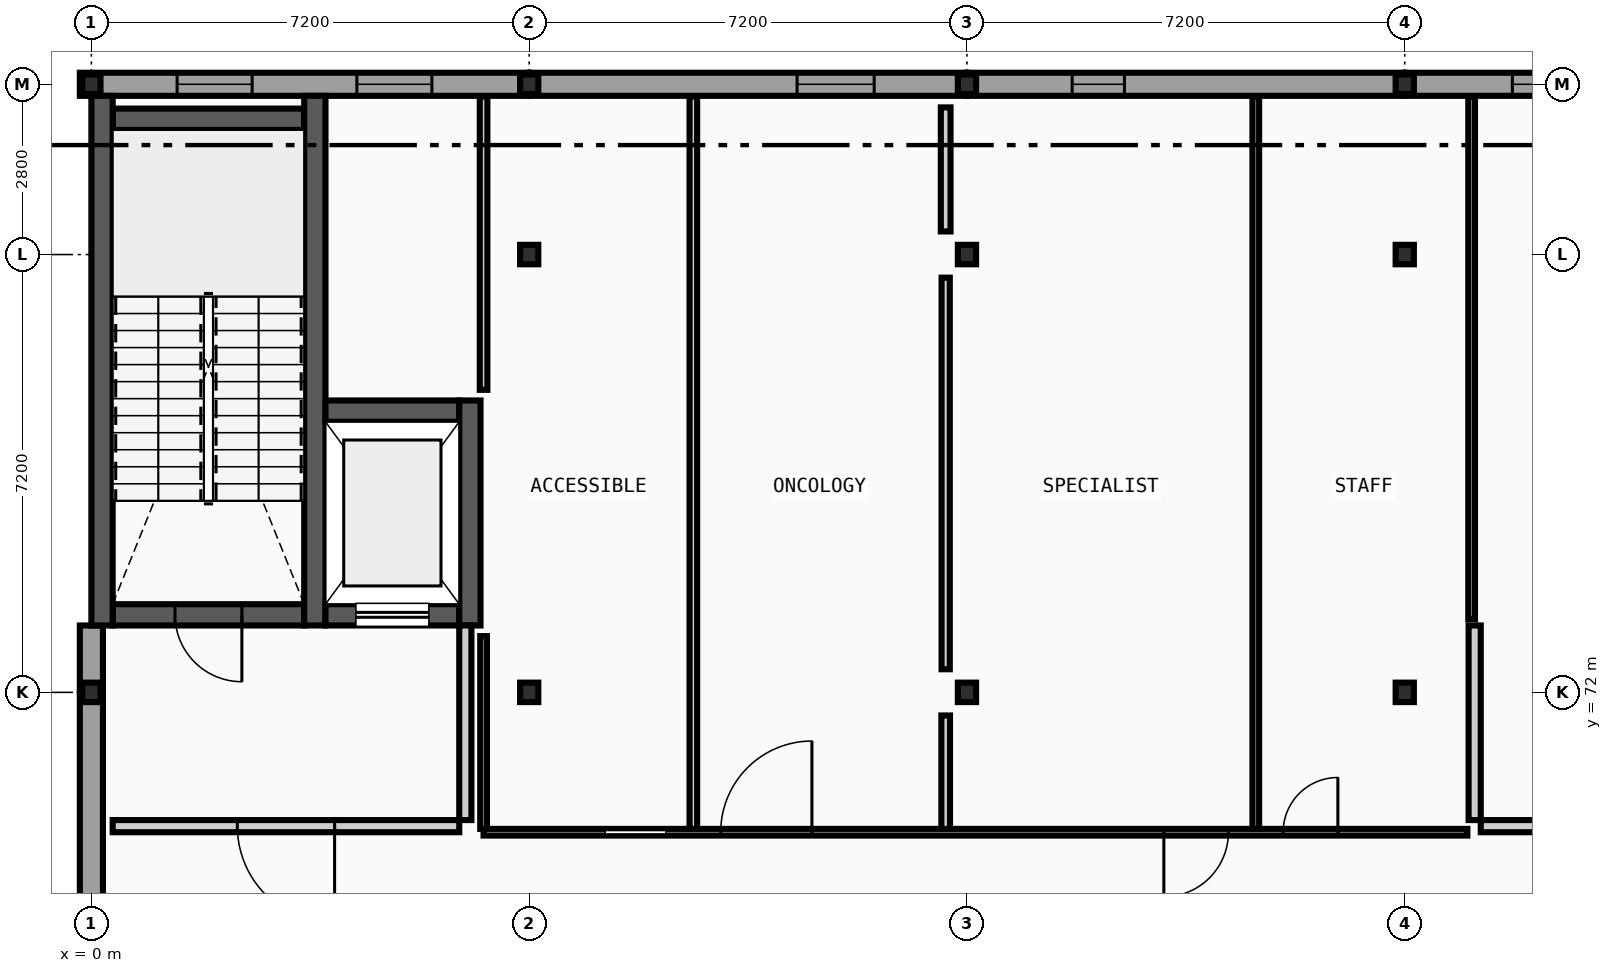
"""IFC4 building model, lengths in metres.
Left out: names, types, materials, properties, quantities, classifications, styles, units other than length and angle.
Written with IfcOpenShell. Run it as: python <this file> out.ifc"""

import sys

from ifc_helpers import new_model, si_unit, direction, frame, frame_2d, origin, origin_2d, place, context, subcontext, project, spatial, rectangle, i_section, extrude, element, fill, save


model = new_model("IFC4")
c1 = context("Model", 3, precision=1e-05, world=origin(), true_north=direction((0.0, 1.0)))
c2 = subcontext(c1, "Body", "Model", "MODEL_VIEW")
j1 = project(units=[si_unit("LENGTHUNIT", "METRE"), si_unit("PLANEANGLEUNIT", "RADIAN")], contexts=[c1])
p1 = place(None, origin())
s1 = spatial("IfcSite", under=j1, at=p1, CompositionType="ELEMENT")
p2 = place(p1, origin())
s2 = spatial("IfcBuilding", under=s1, at=p2, CompositionType="ELEMENT")
p3 = place(p2, frame((0.0, 0.0, 9.6)))
s3 = spatial("IfcBuildingStorey", under=s2, at=p3, CompositionType="ELEMENT", Elevation=9.6)
for number, where, z_axis, x_axis in (
    (1, (0.0, 72.0, 0.0), (0.0, 0.0, 1.0), (1.0, 0.0, 0.0)),
    (2, (0.0, 82.0, 0.0), (0.0, 0.0, 1.0), (1.0, 0.0, 0.0)),
    (3, (7.2, 72.0, 0.0), (0.0, 0.0, 1.0), (1.0, 0.0, 0.0)),
    (4, (7.2, 79.2, 0.0), (0.0, 0.0, 1.0), (1.0, 0.0, 0.0)),
    (5, (7.2, 82.0, 0.0), (0.0, 0.0, 1.0), (1.0, 0.0, 0.0)),
    (6, (14.4, 72.0, 0.0), (0.0, 0.0, 1.0), (1.0, 0.0, 0.0)),
    (7, (14.4, 79.2, 0.0), (0.0, 0.0, 1.0), (1.0, 0.0, 0.0)),
    (8, (14.4, 82.0, 0.0), (0.0, 0.0, 1.0), (1.0, 0.0, 0.0)),
    (9, (21.6, 72.0, 0.0), (0.0, 0.0, 1.0), (1.0, 0.0, 0.0)),
    (10, (21.6, 79.2, 0.0), (0.0, 0.0, 1.0), (1.0, 0.0, 0.0)),
    (11, (21.6, 82.0, 0.0), (0.0, 0.0, 1.0), (1.0, 0.0, 0.0)),
):
    element("IfcColumn", number, at=place(p3, frame(where, z_axis=z_axis, x_axis=x_axis)), inside=s3, PredefinedType="COLUMN", context=c2, shape_type="SweptSolid", body=[
        extrude(i_section(OverallWidth=0.3, OverallDepth=0.32, WebThickness=0.011, FlangeThickness=0.021, FilletRadius=0.027, at=origin_2d()), origin(), (0.0, 0.0, 1.0), 4.4),
    ])
p4 = place(p3, frame((7.2, 82.0, 0.0), z_axis=(0.0, 0.0, 1.0), x_axis=(-1.0, 0.0, 0.0)))
e12 = element("IfcWall", 12, at=p4, inside=s3, PredefinedType="STANDARD", context=c2, shape_type="SweptSolid", body=[
    extrude(rectangle(XDim=7.39, YDim=0.38, at=frame_2d((3.695, 0.0))), origin(), (0.0, 0.0, 1.0), 3.895),
])
p5 = place(p4, frame((1.6, 0.0, 0.95)))
e13 = element("IfcOpeningElement", 13, at=p5, cuts=e12, PredefinedType="OPENING", context=c2, shape_type="SweptSolid", body=[
    extrude(rectangle(XDim=1.234, YDim=1.26, at=frame_2d((0.617, 0.63))), frame((0.0, 0.2, 0.0), z_axis=(0.0, -1.0, 0.0), x_axis=(1.0, 0.0, 0.0)), (0.0, 0.0, 1.0), 0.4),
])
p6 = place(p4, frame((4.556, 0.0, 0.95)))
e14 = element("IfcOpeningElement", 14, at=p6, cuts=e12, PredefinedType="OPENING", context=c2, shape_type="SweptSolid", body=[
    extrude(rectangle(XDim=1.234, YDim=1.26, at=frame_2d((0.617, 0.63))), frame((0.0, 0.2, 0.0), z_axis=(0.0, -1.0, 0.0), x_axis=(1.0, 0.0, 0.0)), (0.0, 0.0, 1.0), 0.4),
])
p7 = place(p3, frame((14.4, 82.0, 0.0), z_axis=(0.0, 0.0, 1.0), x_axis=(-1.0, 0.0, 0.0)))
e15 = element("IfcWall", 15, at=p7, inside=s3, PredefinedType="STANDARD", context=c2, shape_type="SweptSolid", body=[
    extrude(rectangle(XDim=7.2, YDim=0.38, at=frame_2d((3.6, 0.0))), origin(), (0.0, 0.0, 1.0), 3.895),
])
p8 = place(p7, frame((1.526, 0.0, 0.95)))
e16 = element("IfcOpeningElement", 16, at=p8, cuts=e15, PredefinedType="OPENING", context=c2, shape_type="SweptSolid", body=[
    extrude(rectangle(XDim=1.268, YDim=1.26, at=frame_2d((0.634, 0.63))), frame((0.0, 0.2, 0.0), z_axis=(0.0, -1.0, 0.0), x_axis=(1.0, 0.0, 0.0)), (0.0, 0.0, 1.0), 0.4),
])
p9 = place(p3, frame((21.6, 82.0, 0.0), z_axis=(0.0, 0.0, 1.0), x_axis=(-1.0, 0.0, 0.0)))
e17 = element("IfcWall", 17, at=p9, inside=s3, PredefinedType="STANDARD", context=c2, shape_type="SweptSolid", body=[
    extrude(rectangle(XDim=7.2, YDim=0.38, at=frame_2d((3.6, 0.0))), origin(), (0.0, 0.0, 1.0), 3.895),
])
p10 = place(p9, frame((4.61, 0.0, 0.95)))
e18 = element("IfcOpeningElement", 18, at=p10, cuts=e17, PredefinedType="OPENING", context=c2, shape_type="SweptSolid", body=[
    extrude(rectangle(XDim=0.86, YDim=1.296, at=frame_2d((0.43, 0.648))), frame((0.0, 0.2, 0.0), z_axis=(0.0, -1.0, 0.0), x_axis=(1.0, 0.0, 0.0)), (0.0, 0.0, 1.0), 0.4),
])
p11 = place(p3, frame((28.99, 82.0, 0.0), z_axis=(0.0, 0.0, 1.0), x_axis=(-1.0, 0.0, 0.0)))
e19 = element("IfcWall", 19, at=p11, inside=s3, PredefinedType="STANDARD", context=c2, shape_type="SweptSolid", body=[
    extrude(rectangle(XDim=7.39, YDim=0.38, at=frame_2d((3.695, 0.0))), origin(), (0.0, 0.0, 1.0), 3.895),
])
p12 = place(p11, frame((1.77, 0.0, 0.95)))
e20 = element("IfcOpeningElement", 20, at=p12, cuts=e19, PredefinedType="OPENING", context=c2, shape_type="SweptSolid", body=[
    extrude(rectangle(XDim=0.894, YDim=1.296, at=frame_2d((0.447, 0.648))), frame((0.0, 0.2, 0.0), z_axis=(0.0, -1.0, 0.0), x_axis=(1.0, 0.0, 0.0)), (0.0, 0.0, 1.0), 0.4),
])
p13 = place(p11, frame((4.726, 0.0, 0.95)))
e21 = element("IfcOpeningElement", 21, at=p13, cuts=e19, PredefinedType="OPENING", context=c2, shape_type="SweptSolid", body=[
    extrude(rectangle(XDim=0.894, YDim=1.296, at=frame_2d((0.447, 0.648))), frame((0.0, 0.2, 0.0), z_axis=(0.0, -1.0, 0.0), x_axis=(1.0, 0.0, 0.0)), (0.0, 0.0, 1.0), 0.4),
])
p14 = place(p3, frame((0.0, 72.0, 0.0), z_axis=(0.0, 0.0, 1.0), x_axis=(0.0, -1.0, 0.0)))
e22 = element("IfcWall", 22, at=p14, inside=s3, PredefinedType="STANDARD", context=c2, shape_type="SweptSolid", body=[
    extrude(rectangle(XDim=7.2, YDim=0.38, at=frame_2d((3.6, 0.0))), origin(), (0.0, 0.0, 1.0), 3.885),
])
p15 = place(p3, frame((0.0, 73.1, 0.0), z_axis=(0.0, 0.0, 1.0), x_axis=(0.0, -1.0, 0.0)))
e23 = element("IfcWall", 23, at=p15, inside=s3, PredefinedType="STANDARD", context=c2, shape_type="SweptSolid", body=[
    extrude(rectangle(XDim=1.1, YDim=0.38, at=frame_2d((0.55, 0.0))), origin(), (0.0, 0.0, 1.0), 4.2),
])
p16 = place(p3, frame((0.35, 73.275, 0.0), z_axis=(0.0, 0.0, 1.0), x_axis=(1.0, 0.0, 0.0)))
e24 = element("IfcWall", 24, at=p16, inside=s3, PredefinedType="SHEAR", context=c2, shape_type="SweptSolid", body=[
    extrude(rectangle(XDim=3.15, YDim=0.35, at=frame_2d((1.575, 0.0))), origin(), (0.0, 0.0, 1.0), 4.2),
])
p17 = place(p16, frame((1.025, 0.0, 0.0)))
e25 = element("IfcOpeningElement", 25, at=p17, cuts=e24, PredefinedType="OPENING", context=c2, shape_type="SweptSolid", body=[
    extrude(rectangle(XDim=1.1, YDim=2.15, at=frame_2d((0.55, 1.075))), frame((0.0, 0.185, 0.0), z_axis=(0.0, -1.0, 0.0), x_axis=(1.0, 0.0, 0.0)), (0.0, 0.0, 1.0), 0.37),
])
p18 = place(p3, frame((0.35, 81.425, 0.0), z_axis=(0.0, 0.0, 1.0), x_axis=(1.0, 0.0, 0.0)))
e26 = element("IfcWall", 26, at=p18, inside=s3, PredefinedType="SHEAR", context=c2, shape_type="SweptSolid", body=[
    extrude(rectangle(XDim=3.15, YDim=0.35, at=frame_2d((1.575, 0.0))), origin(), (0.0, 0.0, 1.0), 4.2),
])
for number, where, z_axis, x_axis in (
    (27, (0.175, 73.1, 0.0), (0.0, 0.0, 1.0), (0.0, 1.0, 0.0)),
    (28, (3.675, 73.1, 0.0), (0.0, 0.0, 1.0), (0.0, 1.0, 0.0)),
):
    element("IfcWall", number, at=place(p3, frame(where, z_axis=z_axis, x_axis=x_axis)), inside=s3, PredefinedType="SHEAR", context=c2, shape_type="SweptSolid", body=[
        extrude(rectangle(XDim=8.71, YDim=0.35, at=frame_2d((4.355, 0.0))), origin(), (0.0, 0.0, 1.0), 4.2),
    ])
p19 = place(p3, frame((3.85, 73.275, 0.0), z_axis=(0.0, 0.0, 1.0), x_axis=(1.0, 0.0, 0.0)))
e29 = element("IfcWall", 29, at=p19, inside=s3, PredefinedType="SHEAR", context=c2, shape_type="SweptSolid", body=[
    extrude(rectangle(XDim=2.2, YDim=0.35, at=frame_2d((1.1, 0.0))), origin(), (0.0, 0.0, 1.0), 4.2),
])
p20 = place(p19, frame((0.5, 0.0, 0.0)))
e30 = element("IfcOpeningElement", 30, at=p20, cuts=e29, PredefinedType="OPENING", context=c2, shape_type="SweptSolid", body=[
    extrude(rectangle(XDim=1.2, YDim=2.2, at=frame_2d((0.6, 1.1))), frame((0.0, 0.185, 0.0), z_axis=(0.0, -1.0, 0.0), x_axis=(1.0, 0.0, 0.0)), (0.0, 0.0, 1.0), 0.37),
])
p21 = place(p3, frame((3.85, 76.625, 0.0), z_axis=(0.0, 0.0, 1.0), x_axis=(1.0, 0.0, 0.0)))
e31 = element("IfcWall", 31, at=p21, inside=s3, PredefinedType="SHEAR", context=c2, shape_type="SweptSolid", body=[
    extrude(rectangle(XDim=2.2, YDim=0.35, at=frame_2d((1.1, 0.0))), origin(), (0.0, 0.0, 1.0), 4.2),
])
p22 = place(p3, frame((6.225, 73.1, 0.0), z_axis=(0.0, 0.0, 1.0), x_axis=(0.0, 1.0, 0.0)))
e32 = element("IfcWall", 32, at=p22, inside=s3, PredefinedType="SHEAR", context=c2, shape_type="SweptSolid", body=[
    extrude(rectangle(XDim=3.7, YDim=0.35, at=frame_2d((1.85, 0.0))), origin(), (0.0, 0.0, 1.0), 4.2),
])
p23 = place(p3, frame((0.35, 69.8, 0.0), z_axis=(0.0, 0.0, 1.0), x_axis=(1.0, 0.0, 0.0)))
e33 = element("IfcWall", 33, at=p23, inside=s3, PredefinedType="PARTITIONING", context=c2, shape_type="SweptSolid", body=[
    extrude(rectangle(XDim=5.7, YDim=0.2, at=frame_2d((2.85, 0.0))), origin(), (0.0, 0.0, 1.0), 4.2),
])
p24 = place(p23, frame((2.05, 0.0, 0.0)))
e34 = element("IfcOpeningElement", 34, at=p24, cuts=e33, PredefinedType="OPENING", context=c2, shape_type="SweptSolid", body=[
    extrude(rectangle(XDim=1.6, YDim=2.2, at=frame_2d((0.8, 1.1))), frame((0.0, 0.11, 0.0), z_axis=(0.0, -1.0, 0.0), x_axis=(1.0, 0.0, 0.0)), (0.0, 0.0, 1.0), 0.22),
])
p25 = place(p3, frame((6.15, 69.9, 0.0), z_axis=(0.0, 0.0, 1.0), x_axis=(0.0, 1.0, 0.0)))
e35 = element("IfcWall", 35, at=p25, inside=s3, PredefinedType="PARTITIONING", context=c2, shape_type="SweptSolid", body=[
    extrude(rectangle(XDim=3.2, YDim=0.2, at=frame_2d((1.6, 0.0))), origin(), (0.0, 0.0, 1.0), 4.2),
])
p26 = place(p3, frame((22.85, 69.8, 0.0), z_axis=(0.0, 0.0, 1.0), x_axis=(1.0, 0.0, 0.0)))
e36 = element("IfcWall", 36, at=p26, inside=s3, PredefinedType="PARTITIONING", context=c2, shape_type="SweptSolid", body=[
    extrude(rectangle(XDim=5.6, YDim=0.2, at=frame_2d((2.8, 0.0))), origin(), (0.0, 0.0, 1.0), 4.2),
])
p27 = place(p26, frame((2.0, 0.0, 0.0)))
e37 = element("IfcOpeningElement", 37, at=p27, cuts=e36, PredefinedType="OPENING", context=c2, shape_type="SweptSolid", body=[
    extrude(rectangle(XDim=1.6, YDim=2.2, at=frame_2d((0.8, 1.1))), frame((0.0, 0.11, 0.0), z_axis=(0.0, -1.0, 0.0), x_axis=(1.0, 0.0, 0.0)), (0.0, 0.0, 1.0), 0.22),
])
p28 = place(p3, frame((22.75, 69.9, 0.0), z_axis=(0.0, 0.0, 1.0), x_axis=(0.0, 1.0, 0.0)))
e38 = element("IfcWall", 38, at=p28, inside=s3, PredefinedType="PARTITIONING", context=c2, shape_type="SweptSolid", body=[
    extrude(rectangle(XDim=3.2, YDim=0.2, at=frame_2d((1.6, 0.0))), origin(), (0.0, 0.0, 1.0), 4.2),
])
p29 = place(p3, frame((6.45, 69.7, 0.0), z_axis=(0.0, 0.0, 1.0), x_axis=(1.0, 0.0, 0.0)))
e39 = element("IfcWall", 39, at=p29, inside=s3, PredefinedType="PARTITIONING", context=c2, shape_type="SweptSolid", body=[
    extrude(rectangle(XDim=16.18, YDim=0.11, at=frame_2d((8.09, 0.0))), origin(), (0.0, 0.0, 1.0), 4.2),
])
p30 = place(p29, frame((2.0, 0.0, 0.0)))
e40 = element("IfcOpeningElement", 40, at=p30, cuts=e39, PredefinedType="OPENING", context=c2, shape_type="SweptSolid", body=[
    extrude(rectangle(XDim=1.0, YDim=2.1, at=frame_2d((0.5, 1.05))), frame((0.0, 0.065, 0.0), z_axis=(0.0, -1.0, 0.0), x_axis=(1.0, 0.0, 0.0)), (0.0, 0.0, 1.0), 0.13),
])
p31 = place(p29, frame((13.15, 0.0, 0.0)))
e41 = element("IfcOpeningElement", 41, at=p31, cuts=e39, PredefinedType="OPENING", context=c2, shape_type="SweptSolid", body=[
    extrude(rectangle(XDim=0.9, YDim=2.1, at=frame_2d((0.45, 1.05))), frame((0.0, 0.065, 0.0), z_axis=(0.0, -1.0, 0.0), x_axis=(1.0, 0.0, 0.0)), (0.0, 0.0, 1.0), 0.13),
])
p32 = place(p29, frame((3.9, 0.0, 0.0)))
e42 = element("IfcOpeningElement", 42, at=p32, cuts=e39, PredefinedType="OPENING", context=c2, shape_type="SweptSolid", body=[
    extrude(rectangle(XDim=1.5, YDim=2.2, at=frame_2d((0.75, 1.1))), frame((0.0, 0.065, 0.0), z_axis=(0.0, -1.0, 0.0), x_axis=(1.0, 0.0, 0.0)), (0.0, 0.0, 1.0), 0.13),
])
p33 = place(p29, frame((11.188, 0.0, 0.0)))
e43 = element("IfcOpeningElement", 43, at=p33, cuts=e39, PredefinedType="OPENING", context=c2, shape_type="SweptSolid", body=[
    extrude(rectangle(XDim=1.062, YDim=2.152, at=frame_2d((0.531, 1.076))), frame((0.0, 0.065, 0.0), z_axis=(0.0, -1.0, 0.0), x_axis=(1.0, 0.0, 0.0)), (0.0, 0.0, 1.0), 0.13),
])
p34 = place(p3, frame((6.45, 69.755, 0.0), z_axis=(0.0, 0.0, 1.0), x_axis=(0.0, 1.0, 0.0)))
e44 = element("IfcWall", 44, at=p34, inside=s3, PredefinedType="PARTITIONING", context=c2, shape_type="SweptSolid", body=[
    extrude(rectangle(XDim=3.17, YDim=0.11, at=frame_2d((1.585, 0.0))), origin(), (0.0, 0.0, 1.0), 4.2),
])
p35 = place(p3, frame((6.45, 76.975, 0.0), z_axis=(0.0, 0.0, 1.0), x_axis=(0.0, 1.0, 0.0)))
e45 = element("IfcWall", 45, at=p35, inside=s3, PredefinedType="PARTITIONING", context=c2, shape_type="SweptSolid", body=[
    extrude(rectangle(XDim=4.825, YDim=0.125, at=frame_2d((2.413, 0.0))), origin(), (0.0, 0.0, 1.0), 4.2),
])
p36 = place(p3, frame((9.9, 69.755, 0.0), z_axis=(0.0, 0.0, 1.0), x_axis=(0.0, 1.0, 0.0)))
e46 = element("IfcWall", 46, at=p36, inside=s3, PredefinedType="PARTITIONING", context=c2, shape_type="SweptSolid", body=[
    extrude(rectangle(XDim=12.045, YDim=0.125, at=frame_2d((6.022, 0.0))), origin(), (0.0, 0.0, 1.0), 4.2),
])
p37 = place(p3, frame((14.05, 69.755, 0.0), z_axis=(0.0, 0.0, 1.0), x_axis=(0.0, 1.0, 0.0)))
e47 = element("IfcWall", 47, at=p37, inside=s3, PredefinedType="PARTITIONING", context=c2, shape_type="SweptSolid", body=[
    extrude(rectangle(XDim=1.865, YDim=0.142, at=frame_2d((0.933, 0.0))), origin(), (0.0, 0.0, 1.0), 4.2),
])
p38 = place(p3, frame((14.05, 72.38, 0.0), z_axis=(0.0, 0.0, 1.0), x_axis=(0.0, 1.0, 0.0)))
e48 = element("IfcWall", 48, at=p38, inside=s3, PredefinedType="PARTITIONING", context=c2, shape_type="SweptSolid", body=[
    extrude(rectangle(XDim=6.44, YDim=0.135, at=frame_2d((3.22, 0.0))), origin(), (0.0, 0.0, 1.0), 4.2),
])
p39 = place(p3, frame((14.05, 79.58, 0.0), z_axis=(0.0, 0.0, 1.0), x_axis=(0.0, 1.0, 0.0)))
e49 = element("IfcWall", 49, at=p39, inside=s3, PredefinedType="PARTITIONING", context=c2, shape_type="SweptSolid", body=[
    extrude(rectangle(XDim=2.04, YDim=0.16, at=frame_2d((1.02, 0.0))), origin(), (0.0, 0.0, 1.0), 4.2),
])
p40 = place(p3, frame((19.15, 69.755, 0.0), z_axis=(0.0, 0.0, 1.0), x_axis=(0.0, 1.0, 0.0)))
e50 = element("IfcWall", 50, at=p40, inside=s3, PredefinedType="PARTITIONING", context=c2, shape_type="SweptSolid", body=[
    extrude(rectangle(XDim=12.045, YDim=0.11, at=frame_2d((6.022, 0.0))), origin(), (0.0, 0.0, 1.0), 3.915),
])
p41 = place(p3, frame((22.7, 73.2, 0.0), z_axis=(0.0, 0.0, 1.0), x_axis=(0.0, 1.0, 0.0)))
e51 = element("IfcWall", 51, at=p41, inside=s3, PredefinedType="PARTITIONING", context=c2, shape_type="SweptSolid", body=[
    extrude(rectangle(XDim=8.6, YDim=0.11, at=frame_2d((4.3, 0.0))), origin(), (0.0, 0.0, 1.0), 4.2),
])
p42 = place(p5, origin())
e52 = element("IfcWindow", 52, at=p42, inside=s3, PartitioningType="SINGLE_PANEL", PredefinedType="WINDOW", context=c2, shape_type="SweptSolid", body=[
    extrude(rectangle(XDim=1.234, YDim=1.26, at=frame_2d((0.617, 0.63))), frame((0.0, 0.03, 0.0), z_axis=(0.0, -1.0, 0.0), x_axis=(1.0, 0.0, 0.0)), (0.0, 0.0, 1.0), 0.06),
])
fill(e13, e52)
p43 = place(p6, origin())
e53 = element("IfcWindow", 53, at=p43, inside=s3, PartitioningType="SINGLE_PANEL", PredefinedType="WINDOW", context=c2, shape_type="SweptSolid", body=[
    extrude(rectangle(XDim=1.234, YDim=1.26, at=frame_2d((0.617, 0.63))), frame((0.0, 0.03, 0.0), z_axis=(0.0, -1.0, 0.0), x_axis=(1.0, 0.0, 0.0)), (0.0, 0.0, 1.0), 0.06),
])
fill(e14, e53)
p44 = place(p8, origin())
e54 = element("IfcWindow", 54, at=p44, inside=s3, PartitioningType="SINGLE_PANEL", PredefinedType="WINDOW", context=c2, shape_type="SweptSolid", body=[
    extrude(rectangle(XDim=1.268, YDim=1.26, at=frame_2d((0.634, 0.63))), frame((0.0, 0.03, 0.0), z_axis=(0.0, -1.0, 0.0), x_axis=(1.0, 0.0, 0.0)), (0.0, 0.0, 1.0), 0.06),
])
fill(e16, e54)
p45 = place(p10, origin())
e55 = element("IfcWindow", 55, at=p45, inside=s3, PartitioningType="SINGLE_PANEL", PredefinedType="WINDOW", context=c2, shape_type="SweptSolid", body=[
    extrude(rectangle(XDim=0.86, YDim=1.296, at=frame_2d((0.43, 0.648))), frame((0.0, 0.03, 0.0), z_axis=(0.0, -1.0, 0.0), x_axis=(1.0, 0.0, 0.0)), (0.0, 0.0, 1.0), 0.06),
])
fill(e18, e55)
p46 = place(p13, origin())
e56 = element("IfcWindow", 56, at=p46, inside=s3, PartitioningType="SINGLE_PANEL", PredefinedType="WINDOW", context=c2, shape_type="SweptSolid", body=[
    extrude(rectangle(XDim=0.894, YDim=1.296, at=frame_2d((0.447, 0.648))), frame((0.0, 0.03, 0.0), z_axis=(0.0, -1.0, 0.0), x_axis=(1.0, 0.0, 0.0)), (0.0, 0.0, 1.0), 0.06),
])
fill(e21, e56)
p47 = place(p17, origin())
e57 = element("IfcDoor", 57, at=p47, inside=s3, OperationType="SINGLE_SWING_RIGHT", PredefinedType="DOOR", context=c2, shape_type="SweptSolid", body=[
    extrude(rectangle(XDim=1.1, YDim=2.15, at=frame_2d((0.55, 1.075))), frame((0.0, 0.025, 0.0), z_axis=(0.0, -1.0, 0.0), x_axis=(1.0, 0.0, 0.0)), (0.0, 0.0, 1.0), 0.05),
])
fill(e25, e57)
p48 = place(p20, origin())
e58 = element("IfcDoor", 58, at=p48, inside=s3, OperationType="SLIDING_TO_RIGHT", PredefinedType="DOOR", context=c2, shape_type="SweptSolid", body=[
    extrude(rectangle(XDim=1.2, YDim=2.2, at=frame_2d((0.6, 1.1))), frame((0.0, 0.025, 0.0), z_axis=(0.0, -1.0, 0.0), x_axis=(1.0, 0.0, 0.0)), (0.0, 0.0, 1.0), 0.05),
])
fill(e30, e58)
p49 = place(p24, origin())
e59 = element("IfcDoor", 59, at=p49, inside=s3, OperationType="DOUBLE_DOOR_SINGLE_SWING", PredefinedType="DOOR", context=c2, shape_type="SweptSolid", body=[
    extrude(rectangle(XDim=1.6, YDim=2.2, at=frame_2d((0.8, 1.1))), frame((0.0, 0.025, 0.0), z_axis=(0.0, -1.0, 0.0), x_axis=(1.0, 0.0, 0.0)), (0.0, 0.0, 1.0), 0.05),
])
fill(e34, e59)
p50 = place(p30, frame((1.0, 0.0, 0.0), z_axis=(0.0, 0.0, 1.0), x_axis=(-1.0, 0.0, 0.0)))
e60 = element("IfcDoor", 60, at=p50, inside=s3, OperationType="SLIDING_TO_LEFT", PredefinedType="DOOR", context=c2, shape_type="SweptSolid", body=[
    extrude(rectangle(XDim=1.0, YDim=2.1, at=frame_2d((0.5, 1.05))), frame((0.0, 0.025, 0.0), z_axis=(0.0, -1.0, 0.0), x_axis=(1.0, 0.0, 0.0)), (0.0, 0.0, 1.0), 0.05),
])
fill(e40, e60)
p51 = place(p31, frame((0.9, 0.0, 0.0), z_axis=(0.0, 0.0, 1.0), x_axis=(-1.0, 0.0, 0.0)))
e61 = element("IfcDoor", 61, at=p51, inside=s3, OperationType="SINGLE_SWING_RIGHT", PredefinedType="DOOR", context=c2, shape_type="SweptSolid", body=[
    extrude(rectangle(XDim=0.9, YDim=2.1, at=frame_2d((0.45, 1.05))), frame((0.0, 0.025, 0.0), z_axis=(0.0, -1.0, 0.0), x_axis=(1.0, 0.0, 0.0)), (0.0, 0.0, 1.0), 0.05),
])
fill(e41, e61)
p52 = place(p32, frame((1.5, 0.0, 0.0), z_axis=(0.0, 0.0, 1.0), x_axis=(-1.0, 0.0, 0.0)))
e62 = element("IfcDoor", 62, at=p52, inside=s3, OperationType="DOUBLE_DOOR_SINGLE_SWING", PredefinedType="DOOR", context=c2, shape_type="SweptSolid", body=[
    extrude(rectangle(XDim=1.5, YDim=2.2, at=frame_2d((0.75, 1.1))), frame((0.0, 0.025, 0.0), z_axis=(0.0, -1.0, 0.0), x_axis=(1.0, 0.0, 0.0)), (0.0, 0.0, 1.0), 0.05),
])
fill(e42, e62)
p53 = place(p33, frame((1.062, 0.0, 0.0), z_axis=(0.0, 0.0, 1.0), x_axis=(-1.0, 0.0, 0.0)))
e63 = element("IfcDoor", 63, at=p53, inside=s3, OperationType="SINGLE_SWING_LEFT", PredefinedType="DOOR", context=c2, shape_type="SweptSolid", body=[
    extrude(rectangle(XDim=1.062, YDim=2.152, at=frame_2d((0.531, 1.076))), frame((0.0, 0.025, 0.0), z_axis=(0.0, -1.0, 0.0), x_axis=(1.0, 0.0, 0.0)), (0.0, 0.0, 1.0), 0.05),
])
fill(e43, e63)
save(model, sys.argv[1])
